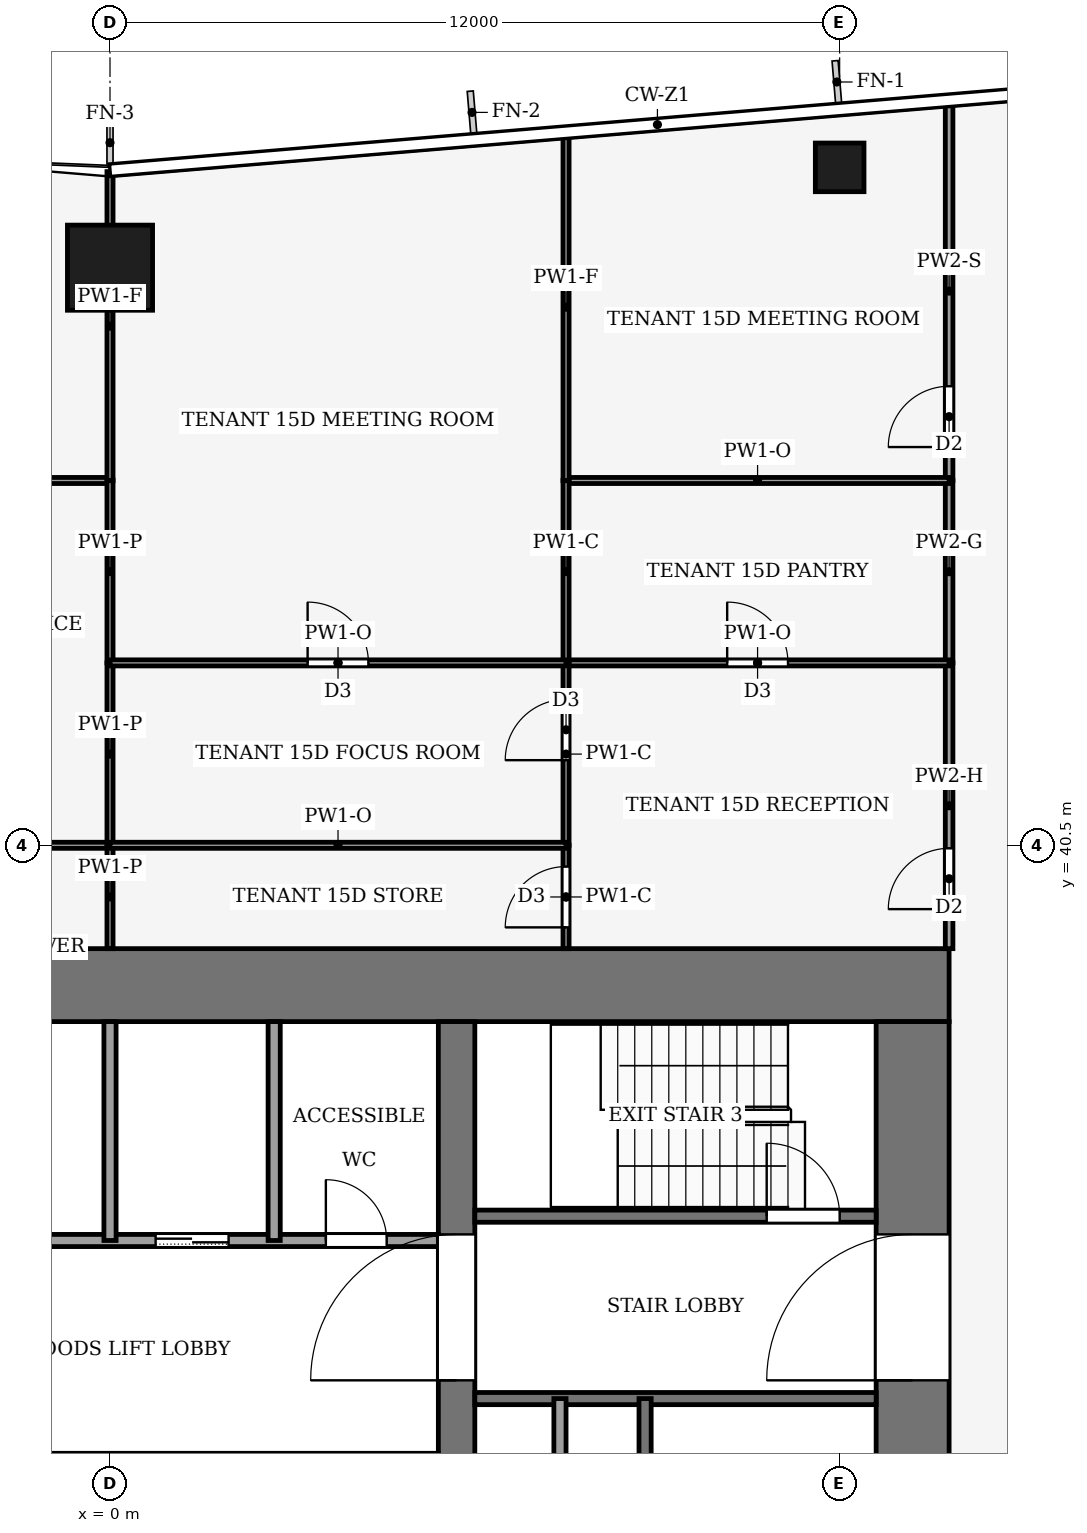
"""IFC4 building model, lengths in metres.
Left out: names, types, materials, properties, quantities, classifications, styles, units other than length and angle.
Written with IfcOpenShell. Run it as: python <this file> out.ifc"""

import sys

from ifc_helpers import new_model, si_unit, direction, frame, frame_2d, origin, origin_2d, place, context, subcontext, project, spatial, rectangle, hollow_rectangle, extrude, element, fill, save


model = new_model("IFC4")
c1 = context("Model", 3, precision=1e-05, world=origin(), true_north=direction((0.0, 1.0)))
c2 = subcontext(c1, "Body", "Model", "MODEL_VIEW")
j1 = project(units=[si_unit("LENGTHUNIT", "METRE"), si_unit("PLANEANGLEUNIT", "RADIAN")], contexts=[c1])
p1 = place(None, origin())
s1 = spatial("IfcSite", under=j1, at=p1, CompositionType="ELEMENT")
p2 = place(p1, origin())
s2 = spatial("IfcBuilding", under=s1, at=p2, CompositionType="ELEMENT")
p3 = place(p2, frame((0.0, 0.0, 70.0)))
s3 = spatial("IfcBuildingStorey", under=s2, at=p3, CompositionType="ELEMENT", Elevation=70.0)
p4 = place(p3, frame((-13.8, 38.2, -0.13), z_axis=(0.0, 0.0, 1.0), x_axis=(1.0, 0.0, 0.0)))
e1 = element("IfcWall", 1, at=p4, inside=s3, PredefinedType="SHEAR", context=c2, shape_type="SweptSolid", body=[
    extrude(rectangle(XDim=27.6, YDim=1.2, at=frame_2d((13.8, 0.0))), origin(), (0.0, 0.0, 1.0), 4.0),
])
p5 = place(p3, frame((13.2, 18.4, -0.13), z_axis=(0.0, 0.0, 1.0), x_axis=(0.0, 1.0, 0.0)))
e2 = element("IfcWall", 2, at=p5, inside=s3, PredefinedType="SHEAR", context=c2, shape_type="SweptSolid", body=[
    extrude(rectangle(XDim=19.2, YDim=1.2, at=frame_2d((9.6, 0.0))), origin(), (0.0, 0.0, 1.0), 4.0),
])
p6 = place(p5, frame((2.8, 0.0, 0.13)))
e3 = element("IfcOpeningElement", 3, at=p6, cuts=e2, PredefinedType="OPENING", context=c2, shape_type="SweptSolid", body=[
    extrude(rectangle(XDim=2.4, YDim=2.4, at=frame_2d((1.2, 1.2))), frame((0.0, 0.61, 0.0), z_axis=(0.0, -1.0, 0.0), x_axis=(1.0, 0.0, 0.0)), (0.0, 0.0, 1.0), 1.22),
])
p7 = place(p5, frame((13.3, 0.0, 0.13)))
e4 = element("IfcOpeningElement", 4, at=p7, cuts=e2, PredefinedType="OPENING", context=c2, shape_type="SweptSolid", body=[
    extrude(rectangle(XDim=2.4, YDim=2.4, at=frame_2d((1.2, 1.2))), frame((0.0, 0.61, 0.0), z_axis=(0.0, -1.0, 0.0), x_axis=(1.0, 0.0, 0.0)), (0.0, 0.0, 1.0), 1.22),
])
p8 = place(p3, frame((5.7, 18.4, -0.13), z_axis=(0.0, 0.0, 1.0), x_axis=(0.0, 1.0, 0.0)))
e5 = element("IfcWall", 5, at=p8, inside=s3, PredefinedType="SHEAR", context=c2, shape_type="SweptSolid", body=[
    extrude(rectangle(XDim=19.2, YDim=0.6, at=frame_2d((9.6, 0.0))), origin(), (0.0, 0.0, 1.0), 4.0),
])
p9 = place(p8, frame((13.3, 0.0, 0.13)))
e6 = element("IfcOpeningElement", 6, at=p9, cuts=e5, PredefinedType="OPENING", context=c2, shape_type="SweptSolid", body=[
    extrude(rectangle(XDim=2.4, YDim=2.4, at=frame_2d((1.2, 1.2))), frame((0.0, 0.31, 0.0), z_axis=(0.0, -1.0, 0.0), x_axis=(1.0, 0.0, 0.0)), (0.0, 0.0, 1.0), 0.62),
])
p10 = place(p3, frame((0.0, 50.0, 0.0), z_axis=(0.0, 0.0, 1.0), x_axis=(1.0, 0.0, 0.0)))
e7 = element("IfcColumn", 7, at=p10, inside=s3, PredefinedType="COLUMN", context=c2, shape_type="SweptSolid", body=[
    extrude(hollow_rectangle(XDim=1.4, YDim=1.4, WallThickness=0.08, at=origin_2d()), origin(), (0.0, 0.0, 1.0), 4.0),
])
p11 = place(p3, frame((12.0, 51.65, 0.0), z_axis=(0.0, 0.0, 1.0), x_axis=(1.0, 0.0, 0.0)))
e8 = element("IfcColumn", 8, at=p11, inside=s3, PredefinedType="COLUMN", context=c2, shape_type="SweptSolid", body=[
    extrude(hollow_rectangle(XDim=0.8, YDim=0.8, WallThickness=0.04, at=origin_2d()), origin(), (0.0, 0.0, 1.0), 4.0),
])
p12 = place(p3, frame((6.0, 31.4, 0.0), z_axis=(0.0, 0.0, 1.0), x_axis=(1.0, 0.0, 0.0)))
e9 = element("IfcWall", 9, at=p12, inside=s3, PredefinedType="PARTITIONING", context=c2, shape_type="SweptSolid", body=[
    extrude(rectangle(XDim=6.6, YDim=0.2, at=frame_2d((3.3, 0.0))), origin(), (0.0, 0.0, 1.0), 3.87),
])
p13 = place(p3, frame((-5.4, 34.0, 0.0), z_axis=(0.0, 0.0, 1.0), x_axis=(1.0, 0.0, 0.0)))
e10 = element("IfcWall", 10, at=p13, inside=s3, PredefinedType="PARTITIONING", context=c2, shape_type="SweptSolid", body=[
    extrude(rectangle(XDim=10.8, YDim=0.2, at=frame_2d((5.4, 0.0))), origin(), (0.0, 0.0, 1.0), 3.87),
])
p14 = place(p13, frame((6.15, 0.0, 0.0)))
e11 = element("IfcOpeningElement", 11, at=p14, cuts=e10, PredefinedType="OPENING", context=c2, shape_type="SweptSolid", body=[
    extrude(rectangle(XDim=1.2, YDim=2.2, at=frame_2d((0.6, 1.1))), frame((0.0, 0.11, 0.0), z_axis=(0.0, -1.0, 0.0), x_axis=(1.0, 0.0, 0.0)), (0.0, 0.0, 1.0), 0.22),
])
p15 = place(p13, frame((8.95, 0.0, 0.0)))
e12 = element("IfcOpeningElement", 12, at=p15, cuts=e10, PredefinedType="OPENING", context=c2, shape_type="SweptSolid", body=[
    extrude(rectangle(XDim=1.0, YDim=2.1, at=frame_2d((0.5, 1.05))), frame((0.0, 0.11, 0.0), z_axis=(0.0, -1.0, 0.0), x_axis=(1.0, 0.0, 0.0)), (0.0, 0.0, 1.0), 0.22),
])
p16 = place(p3, frame((6.0, 34.4, 0.0), z_axis=(0.0, 0.0, 1.0), x_axis=(1.0, 0.0, 0.0)))
e13 = element("IfcWall", 13, at=p16, inside=s3, PredefinedType="PARTITIONING", context=c2, shape_type="SweptSolid", body=[
    extrude(rectangle(XDim=6.6, YDim=0.2, at=frame_2d((3.3, 0.0))), origin(), (0.0, 0.0, 1.0), 3.87),
])
p17 = place(p16, frame((4.8, 0.0, 0.0)))
e14 = element("IfcOpeningElement", 14, at=p17, cuts=e13, PredefinedType="OPENING", context=c2, shape_type="SweptSolid", body=[
    extrude(rectangle(XDim=1.2, YDim=2.2, at=frame_2d((0.6, 1.1))), frame((0.0, 0.11, 0.0), z_axis=(0.0, -1.0, 0.0), x_axis=(1.0, 0.0, 0.0)), (0.0, 0.0, 1.0), 0.22),
])
for number, where, z_axis, x_axis in (
    (15, (0.0, 34.0, 0.0), (0.0, 0.0, 1.0), (0.0, 1.0, 0.0)),
    (16, (2.7, 34.0, 0.0), (0.0, 0.0, 1.0), (0.0, 1.0, 0.0)),
):
    element("IfcWall", number, at=place(p3, frame(where, z_axis=z_axis, x_axis=x_axis)), inside=s3, PredefinedType="PARTITIONING", context=c2, shape_type="SweptSolid", body=[
        extrude(rectangle(XDim=3.6, YDim=0.2, at=frame_2d((1.8, 0.0))), origin(), (0.0, 0.0, 1.0), 3.87),
    ])
for number, where, z_axis, x_axis in (
    (17, (7.4, 24.0, 0.0), (0.0, 0.0, 1.0), (0.0, 1.0, 0.0)),
    (18, (8.8, 24.0, 0.0), (0.0, 0.0, 1.0), (0.0, 1.0, 0.0)),
):
    element("IfcWall", number, at=place(p3, frame(where, z_axis=z_axis, x_axis=x_axis)), inside=s3, PredefinedType="PARTITIONING", context=c2, shape_type="SweptSolid", body=[
        extrude(rectangle(XDim=7.4, YDim=0.2, at=frame_2d((3.7, 0.0))), origin(), (0.0, 0.0, 1.0), 3.87),
    ])
p18 = place(p3, frame((13.8, 38.8, 0.0), z_axis=(0.0, 0.0, 1.0), x_axis=(0.0, 1.0, 0.0)))
e19 = element("IfcWall", 19, at=p18, inside=s3, PredefinedType="PARTITIONING", context=c2, shape_type="SweptSolid", body=[
    extrude(rectangle(XDim=4.7, YDim=0.125, at=frame_2d((2.35, 0.0))), origin(), (0.0, 0.0, 1.0), 3.14),
])
p19 = place(p18, frame((0.65, 0.0, 0.0)))
e20 = element("IfcOpeningElement", 20, at=p19, cuts=e19, PredefinedType="OPENING", context=c2, shape_type="SweptSolid", body=[
    extrude(rectangle(XDim=1.0, YDim=2.1, at=frame_2d((0.5, 1.05))), frame((0.0, 0.073, 0.0), z_axis=(0.0, -1.0, 0.0), x_axis=(1.0, 0.0, 0.0)), (0.0, 0.0, 1.0), 0.145),
])
p20 = place(p3, frame((13.8, 46.5, 0.0), z_axis=(0.0, 0.0, 1.0), x_axis=(0.0, -1.0, 0.0)))
e21 = element("IfcWall", 21, at=p20, inside=s3, PredefinedType="PARTITIONING", context=c2, shape_type="SweptSolid", body=[
    extrude(rectangle(XDim=3.0, YDim=0.125, at=frame_2d((1.5, 0.0))), origin(), (0.0, 0.0, 1.0), 3.87),
])
p21 = place(p3, frame((13.8, 46.5, 0.0), z_axis=(0.0, 0.0, 1.0), x_axis=(0.0, 1.0, 0.0)))
e22 = element("IfcWall", 22, at=p21, inside=s3, PredefinedType="PARTITIONING", context=c2, shape_type="SweptSolid", body=[
    extrude(rectangle(XDim=6.23, YDim=0.125, at=frame_2d((3.115, 0.0))), origin(), (0.0, 0.0, 1.0), 3.04),
])
p22 = place(p21, frame((0.55, 0.0, 0.0)))
e23 = element("IfcOpeningElement", 23, at=p22, cuts=e22, PredefinedType="OPENING", context=c2, shape_type="SweptSolid", body=[
    extrude(rectangle(XDim=1.0, YDim=2.1, at=frame_2d((0.5, 1.05))), frame((0.0, 0.073, 0.0), z_axis=(0.0, -1.0, 0.0), x_axis=(1.0, 0.0, 0.0)), (0.0, 0.0, 1.0), 0.145),
])
p23 = place(p3, frame((0.0, 40.5, 0.0), z_axis=(0.0, 0.0, 1.0), x_axis=(-1.0, 0.0, 0.0)))
e24 = element("IfcWall", 24, at=p23, inside=s3, PredefinedType="PARTITIONING", context=c2, shape_type="SweptSolid", body=[
    extrude(rectangle(XDim=4.5, YDim=0.1, at=frame_2d((2.25, 0.0))), origin(), (0.0, 0.0, 1.0), 3.39),
])
p24 = place(p3, frame((0.0, 38.8, 0.0), z_axis=(0.0, 0.0, 1.0), x_axis=(0.0, 1.0, 0.0)))
e25 = element("IfcWall", 25, at=p24, inside=s3, PredefinedType="PARTITIONING", context=c2, shape_type="SweptSolid", body=[
    extrude(rectangle(XDim=1.7, YDim=0.1, at=frame_2d((0.85, 0.0))), origin(), (0.0, 0.0, 1.0), 3.44),
])
p25 = place(p3, frame((0.0, 46.5, 0.0), z_axis=(0.0, 0.0, 1.0), x_axis=(-1.0, 0.0, 0.0)))
e26 = element("IfcWall", 26, at=p25, inside=s3, PredefinedType="PARTITIONING", context=c2, shape_type="SweptSolid", body=[
    extrude(rectangle(XDim=4.5, YDim=0.1, at=frame_2d((2.25, 0.0))), origin(), (0.0, 0.0, 1.0), 3.39),
])
p26 = place(p3, frame((0.0, 40.5, 0.0), z_axis=(0.0, 0.0, 1.0), x_axis=(0.0, 1.0, 0.0)))
e27 = element("IfcWall", 27, at=p26, inside=s3, PredefinedType="PARTITIONING", context=c2, shape_type="SweptSolid", body=[
    extrude(rectangle(XDim=3.0, YDim=0.1, at=frame_2d((1.5, 0.0))), origin(), (0.0, 0.0, 1.0), 3.44),
])
p27 = place(p3, frame((0.0, 43.5, 0.0), z_axis=(0.0, 0.0, 1.0), x_axis=(0.0, 1.0, 0.0)))
e28 = element("IfcWall", 28, at=p27, inside=s3, PredefinedType="PARTITIONING", context=c2, shape_type="SweptSolid", body=[
    extrude(rectangle(XDim=3.004, YDim=0.1, at=frame_2d((1.502, 0.0))), origin(), (0.0, 0.0, 1.0), 3.44),
])
p28 = place(p3, frame((0.0, 46.496, 0.0), z_axis=(0.0, 0.0, 1.0), x_axis=(0.0, 1.0, 0.0)))
e29 = element("IfcWall", 29, at=p28, inside=s3, PredefinedType="PARTITIONING", context=c2, shape_type="SweptSolid", body=[
    extrude(rectangle(XDim=5.084, YDim=0.1, at=frame_2d((2.542, 0.0))), origin(), (0.0, 0.0, 1.0), 3.04),
])
p29 = place(p3, frame((7.5, 43.5, 0.0), z_axis=(0.0, 0.0, 1.0), x_axis=(1.0, 0.0, 0.0)))
e30 = element("IfcWall", 30, at=p29, inside=s3, PredefinedType="PARTITIONING", context=c2, shape_type="SweptSolid", body=[
    extrude(rectangle(XDim=6.3, YDim=0.1, at=frame_2d((3.15, 0.0))), origin(), (0.0, 0.0, 1.0), 3.39),
])
p30 = place(p29, frame((2.65, 0.0, 0.0)))
e31 = element("IfcOpeningElement", 31, at=p30, cuts=e30, PredefinedType="OPENING", context=c2, shape_type="SweptSolid", body=[
    extrude(rectangle(XDim=1.0, YDim=2.1, at=frame_2d((0.5, 1.05))), frame((0.0, 0.06, 0.0), z_axis=(0.0, -1.0, 0.0), x_axis=(1.0, 0.0, 0.0)), (0.0, 0.0, 1.0), 0.12),
])
p31 = place(p3, frame((7.5, 38.8, 0.0), z_axis=(0.0, 0.0, 1.0), x_axis=(0.0, 1.0, 0.0)))
e32 = element("IfcWall", 32, at=p31, inside=s3, PredefinedType="PARTITIONING", context=c2, shape_type="SweptSolid", body=[
    extrude(rectangle(XDim=1.7, YDim=0.1, at=frame_2d((0.85, 0.0))), origin(), (0.0, 0.0, 1.0), 3.87),
])
p32 = place(p31, frame((0.35, 0.0, 0.0)))
e33 = element("IfcOpeningElement", 33, at=p32, cuts=e32, PredefinedType="OPENING", context=c2, shape_type="SweptSolid", body=[
    extrude(rectangle(XDim=1.0, YDim=2.1, at=frame_2d((0.5, 1.05))), frame((0.0, 0.06, 0.0), z_axis=(0.0, -1.0, 0.0), x_axis=(1.0, 0.0, 0.0)), (0.0, 0.0, 1.0), 0.12),
])
p33 = place(p3, frame((7.5, 40.5, 0.0), z_axis=(0.0, 0.0, 1.0), x_axis=(0.0, 1.0, 0.0)))
e34 = element("IfcWall", 34, at=p33, inside=s3, PredefinedType="PARTITIONING", context=c2, shape_type="SweptSolid", body=[
    extrude(rectangle(XDim=3.0, YDim=0.1, at=frame_2d((1.5, 0.0))), origin(), (0.0, 0.0, 1.0), 3.87),
])
p34 = place(p33, frame((1.4, 0.0, 0.0)))
e35 = element("IfcOpeningElement", 35, at=p34, cuts=e34, PredefinedType="OPENING", context=c2, shape_type="SweptSolid", body=[
    extrude(rectangle(XDim=1.0, YDim=2.1, at=frame_2d((0.5, 1.05))), frame((0.0, 0.06, 0.0), z_axis=(0.0, -1.0, 0.0), x_axis=(1.0, 0.0, 0.0)), (0.0, 0.0, 1.0), 0.12),
])
p35 = place(p3, frame((13.8, 46.5, 0.0), z_axis=(0.0, 0.0, 1.0), x_axis=(-1.0, 0.0, 0.0)))
e36 = element("IfcWall", 36, at=p35, inside=s3, PredefinedType="PARTITIONING", context=c2, shape_type="SweptSolid", body=[
    extrude(rectangle(XDim=6.3, YDim=0.1, at=frame_2d((3.15, 0.0))), origin(), (0.0, 0.0, 1.0), 3.39),
])
p36 = place(p3, frame((7.5, 46.504, 0.0), z_axis=(0.0, 0.0, 1.0), x_axis=(0.0, -1.0, 0.0)))
e37 = element("IfcWall", 37, at=p36, inside=s3, PredefinedType="PARTITIONING", context=c2, shape_type="SweptSolid", body=[
    extrude(rectangle(XDim=3.004, YDim=0.1, at=frame_2d((1.502, 0.0))), origin(), (0.0, 0.0, 1.0), 3.87),
])
p37 = place(p3, frame((7.5, 52.205, 0.0), z_axis=(0.0, 0.0, 1.0), x_axis=(0.0, -1.0, 0.0)))
e38 = element("IfcWall", 38, at=p37, inside=s3, PredefinedType="PARTITIONING", context=c2, shape_type="SweptSolid", body=[
    extrude(rectangle(XDim=5.709, YDim=0.1, at=frame_2d((2.854, 0.0))), origin(), (0.0, 0.0, 1.0), 3.04),
])
p38 = place(p3, frame((7.5, 40.5, 0.0), z_axis=(0.0, 0.0, 1.0), x_axis=(-1.0, 0.0, 0.0)))
e39 = element("IfcWall", 39, at=p38, inside=s3, PredefinedType="PARTITIONING", context=c2, shape_type="SweptSolid", body=[
    extrude(rectangle(XDim=7.5, YDim=0.1, at=frame_2d((3.75, 0.0))), origin(), (0.0, 0.0, 1.0), 3.39),
])
p39 = place(p3, frame((0.0, 43.5, 0.0), z_axis=(0.0, 0.0, 1.0), x_axis=(1.0, 0.0, 0.0)))
e40 = element("IfcWall", 40, at=p39, inside=s3, PredefinedType="PARTITIONING", context=c2, shape_type="SweptSolid", body=[
    extrude(rectangle(XDim=7.5, YDim=0.1, at=frame_2d((3.75, 0.0))), origin(), (0.0, 0.0, 1.0), 3.39),
])
p40 = place(p39, frame((3.25, 0.0, 0.0)))
e41 = element("IfcOpeningElement", 41, at=p40, cuts=e40, PredefinedType="OPENING", context=c2, shape_type="SweptSolid", body=[
    extrude(rectangle(XDim=1.0, YDim=2.1, at=frame_2d((0.5, 1.05))), frame((0.0, 0.06, 0.0), z_axis=(0.0, -1.0, 0.0), x_axis=(1.0, 0.0, 0.0)), (0.0, 0.0, 1.0), 0.12),
])
p41 = place(p14, origin())
e42 = element("IfcDoor", 42, at=p41, inside=s3, OperationType="SLIDING_TO_LEFT", PredefinedType="DOOR", context=c2, shape_type="SweptSolid", body=[
    extrude(rectangle(XDim=1.2, YDim=2.2, at=frame_2d((0.6, 1.1))), frame((0.0, 0.025, 0.0), z_axis=(0.0, -1.0, 0.0), x_axis=(1.0, 0.0, 0.0)), (0.0, 0.0, 1.0), 0.05),
])
fill(e11, e42)
p42 = place(p15, origin())
e43 = element("IfcDoor", 43, at=p42, inside=s3, OperationType="SINGLE_SWING_LEFT", PredefinedType="DOOR", context=c2, shape_type="SweptSolid", body=[
    extrude(rectangle(XDim=1.0, YDim=2.1, at=frame_2d((0.5, 1.05))), frame((0.0, 0.025, 0.0), z_axis=(0.0, -1.0, 0.0), x_axis=(1.0, 0.0, 0.0)), (0.0, 0.0, 1.0), 0.05),
])
fill(e12, e43)
p43 = place(p17, origin())
e44 = element("IfcDoor", 44, at=p43, inside=s3, OperationType="SINGLE_SWING_LEFT", PredefinedType="DOOR", context=c2, shape_type="SweptSolid", body=[
    extrude(rectangle(XDim=1.2, YDim=2.2, at=frame_2d((0.6, 1.1))), frame((0.0, 0.025, 0.0), z_axis=(0.0, -1.0, 0.0), x_axis=(1.0, 0.0, 0.0)), (0.0, 0.0, 1.0), 0.05),
])
fill(e14, e44)
p44 = place(p9, origin())
e45 = element("IfcDoor", 45, at=p44, inside=s3, OperationType="DOUBLE_DOOR_SINGLE_SWING", PredefinedType="DOOR", context=c2, shape_type="SweptSolid", body=[
    extrude(rectangle(XDim=2.4, YDim=2.4, at=frame_2d((1.2, 1.2))), frame((0.0, 0.025, 0.0), z_axis=(0.0, -1.0, 0.0), x_axis=(1.0, 0.0, 0.0)), (0.0, 0.0, 1.0), 0.05),
])
fill(e6, e45)
p45 = place(p7, origin())
e46 = element("IfcDoor", 46, at=p45, inside=s3, OperationType="DOUBLE_DOOR_SINGLE_SWING", PredefinedType="DOOR", context=c2, shape_type="SweptSolid", body=[
    extrude(rectangle(XDim=2.4, YDim=2.4, at=frame_2d((1.2, 1.2))), frame((0.0, 0.025, 0.0), z_axis=(0.0, -1.0, 0.0), x_axis=(1.0, 0.0, 0.0)), (0.0, 0.0, 1.0), 0.05),
])
fill(e4, e46)
p46 = place(p19, origin())
e47 = element("IfcDoor", 47, at=p46, inside=s3, OperationType="SINGLE_SWING_LEFT", PredefinedType="DOOR", context=c2, shape_type="SweptSolid", body=[
    extrude(rectangle(XDim=1.0, YDim=2.1, at=frame_2d((0.5, 1.05))), frame((0.0, 0.025, 0.0), z_axis=(0.0, -1.0, 0.0), x_axis=(1.0, 0.0, 0.0)), (0.0, 0.0, 1.0), 0.05),
])
fill(e20, e47)
p47 = place(p22, origin())
e48 = element("IfcDoor", 48, at=p47, inside=s3, OperationType="SINGLE_SWING_LEFT", PredefinedType="DOOR", context=c2, shape_type="SweptSolid", body=[
    extrude(rectangle(XDim=1.0, YDim=2.1, at=frame_2d((0.5, 1.05))), frame((0.0, 0.025, 0.0), z_axis=(0.0, -1.0, 0.0), x_axis=(1.0, 0.0, 0.0)), (0.0, 0.0, 1.0), 0.05),
])
fill(e23, e48)
p48 = place(p30, origin())
e49 = element("IfcDoor", 49, at=p48, inside=s3, OperationType="SINGLE_SWING_RIGHT", PredefinedType="DOOR", context=c2, shape_type="SweptSolid", body=[
    extrude(rectangle(XDim=1.0, YDim=2.1, at=frame_2d((0.5, 1.05))), frame((0.0, 0.025, 0.0), z_axis=(0.0, -1.0, 0.0), x_axis=(1.0, 0.0, 0.0)), (0.0, 0.0, 1.0), 0.05),
])
fill(e31, e49)
p49 = place(p32, origin())
e50 = element("IfcDoor", 50, at=p49, inside=s3, OperationType="SINGLE_SWING_LEFT", PredefinedType="DOOR", context=c2, shape_type="SweptSolid", body=[
    extrude(rectangle(XDim=1.0, YDim=2.1, at=frame_2d((0.5, 1.05))), frame((0.0, 0.025, 0.0), z_axis=(0.0, -1.0, 0.0), x_axis=(1.0, 0.0, 0.0)), (0.0, 0.0, 1.0), 0.05),
])
fill(e33, e50)
p50 = place(p34, origin())
e51 = element("IfcDoor", 51, at=p50, inside=s3, OperationType="SINGLE_SWING_RIGHT", PredefinedType="DOOR", context=c2, shape_type="SweptSolid", body=[
    extrude(rectangle(XDim=1.0, YDim=2.1, at=frame_2d((0.5, 1.05))), frame((0.0, 0.025, 0.0), z_axis=(0.0, -1.0, 0.0), x_axis=(1.0, 0.0, 0.0)), (0.0, 0.0, 1.0), 0.05),
])
fill(e35, e51)
p51 = place(p40, origin())
e52 = element("IfcDoor", 52, at=p51, inside=s3, OperationType="SINGLE_SWING_LEFT", PredefinedType="DOOR", context=c2, shape_type="SweptSolid", body=[
    extrude(rectangle(XDim=1.0, YDim=2.1, at=frame_2d((0.5, 1.05))), frame((0.0, 0.025, 0.0), z_axis=(0.0, -1.0, 0.0), x_axis=(1.0, 0.0, 0.0)), (0.0, 0.0, 1.0), 0.05),
])
fill(e41, e52)
save(model, sys.argv[1])
